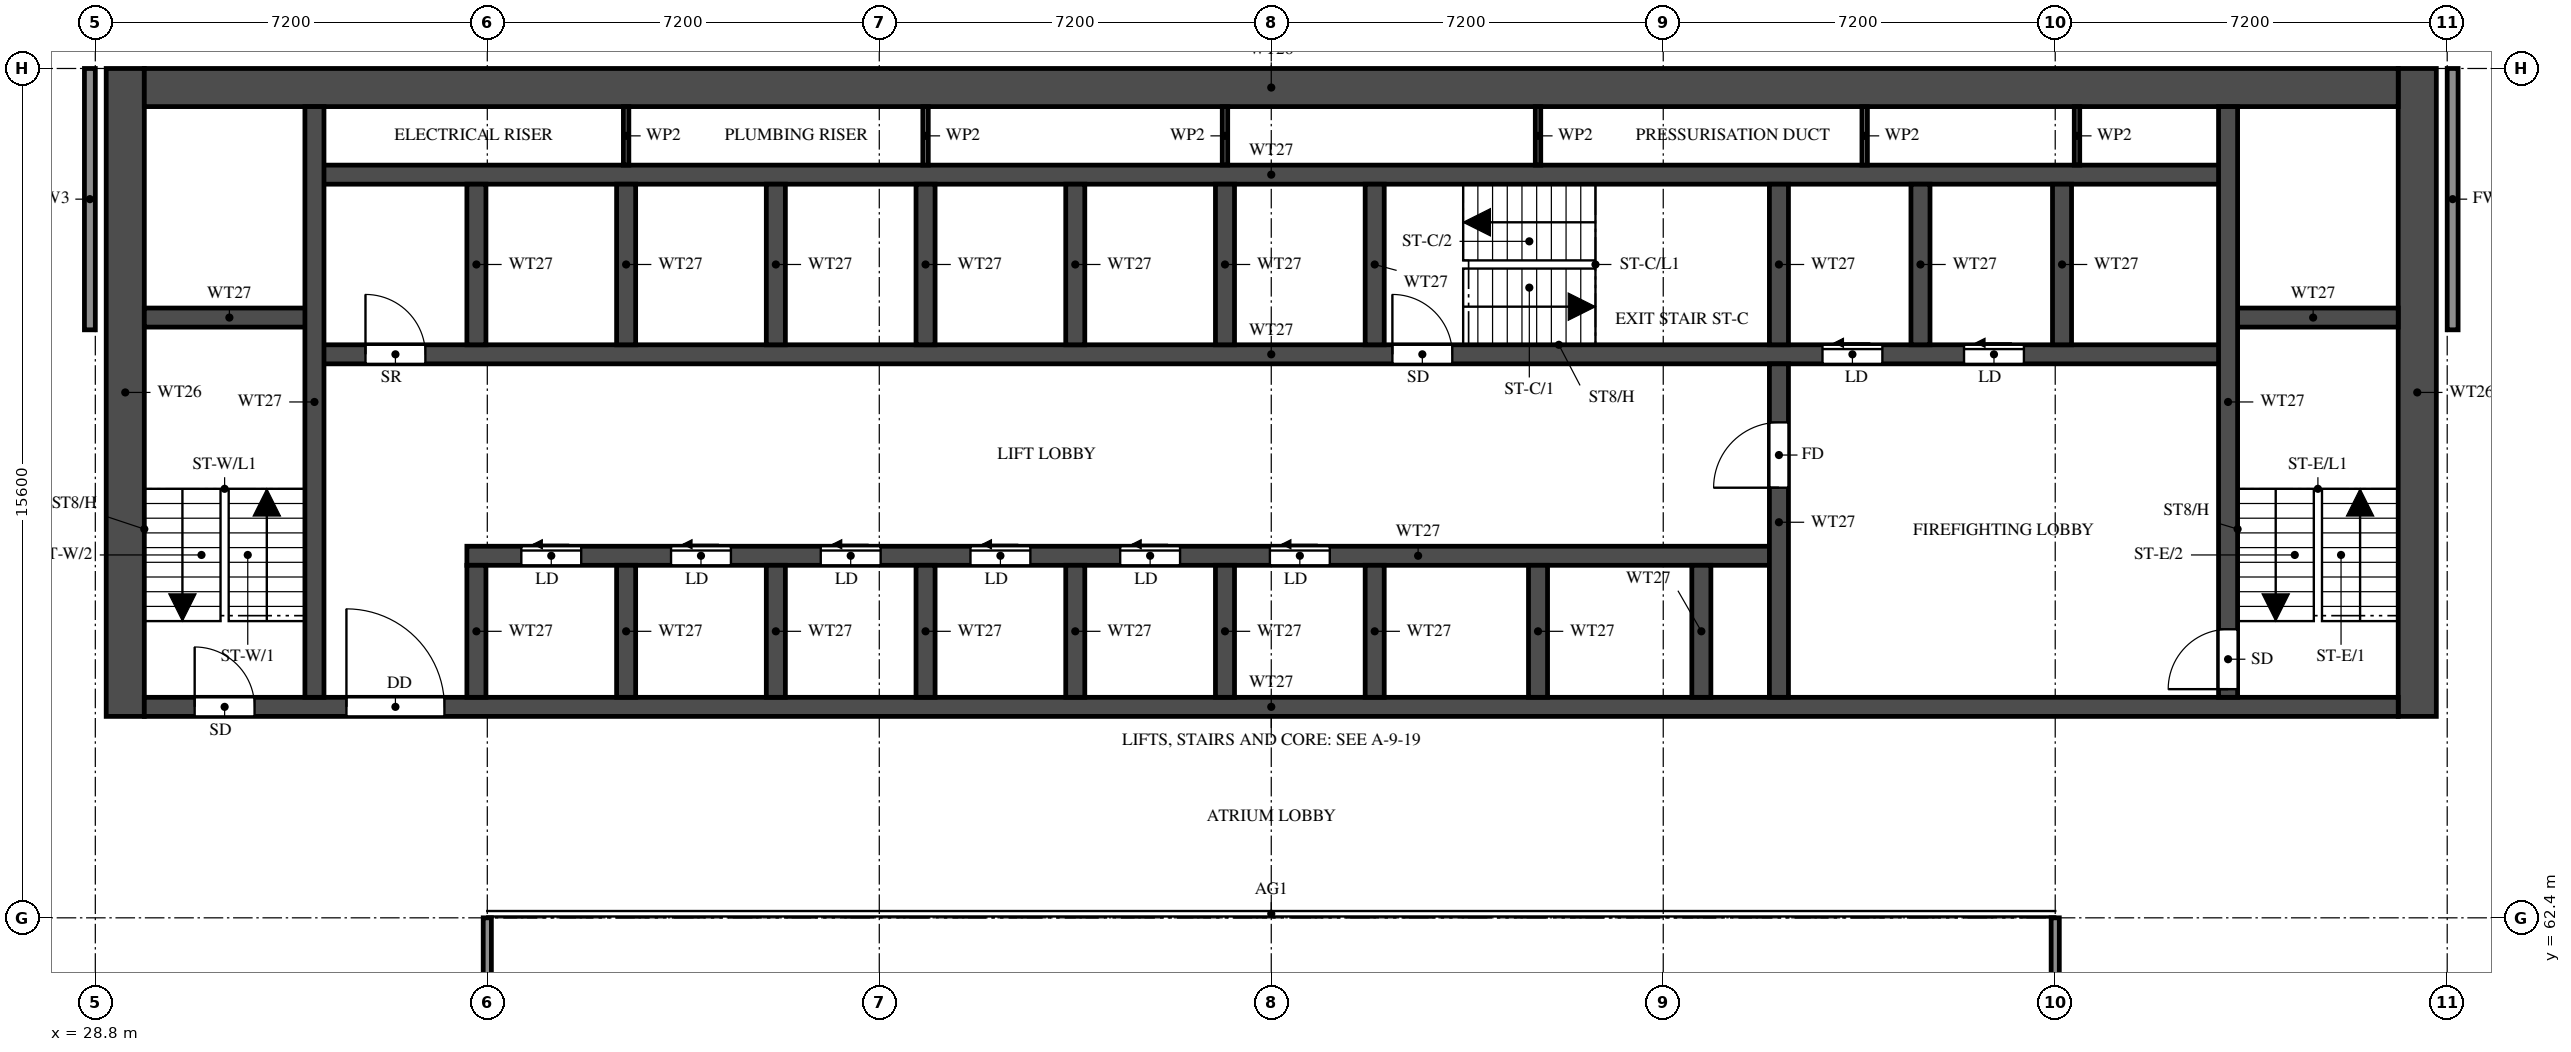
"""IFC4 building model, lengths in metres.
Left out: names, types, materials, properties, quantities, classifications, styles, units other than length and angle.
Written with IfcOpenShell. Run it as: python <this file> out.ifc"""

import sys

from ifc_helpers import new_model, si_unit, direction, frame, frame_2d, origin, place, context, subcontext, project, spatial, rectangle, extrude, element, fill, save


model = new_model("IFC4")
c1 = context("Model", 3, precision=1e-05, world=origin(), true_north=direction((0.0, 1.0)))
c2 = subcontext(c1, "Body", "Model", "MODEL_VIEW")
j1 = project(units=[si_unit("LENGTHUNIT", "METRE"), si_unit("PLANEANGLEUNIT", "RADIAN")], contexts=[c1])
p1 = place(None, origin())
s1 = spatial("IfcSite", under=j1, at=p1, CompositionType="ELEMENT")
p2 = place(p1, origin())
s2 = spatial("IfcBuilding", under=s1, at=p2, CompositionType="ELEMENT")
p3 = place(p2, frame((0.0, 0.0, 130.5)))
s3 = spatial("IfcBuildingStorey", under=s2, at=p3, CompositionType="ELEMENT", Elevation=130.5)
for number, where, z_axis, x_axis in (
    (1, (29.35, 66.1, 0.0), (0.0, 0.0, 1.0), (0.0, 1.0, 0.0)),
    (2, (71.45, 66.1, 0.0), (0.0, 0.0, 1.0), (0.0, 1.0, 0.0)),
):
    element("IfcWall", number, at=place(p3, frame(where, z_axis=z_axis, x_axis=x_axis)), inside=s3, PredefinedType="SHEAR", context=c2, shape_type="SweptSolid", body=[
        extrude(rectangle(XDim=11.9, YDim=0.7, at=frame_2d((5.95, 0.0))), origin(), (0.0, 0.0, 1.0), 3.2),
    ])
p4 = place(p3, frame((29.7, 77.65, 0.0), z_axis=(0.0, 0.0, 1.0), x_axis=(1.0, 0.0, 0.0)))
e3 = element("IfcWall", 3, at=p4, inside=s3, PredefinedType="SHEAR", context=c2, shape_type="SweptSolid", body=[
    extrude(rectangle(XDim=41.4, YDim=0.7, at=frame_2d((20.7, 0.0))), origin(), (0.0, 0.0, 1.0), 3.2),
])
p5 = place(p3, frame((29.7, 66.275, 0.0), z_axis=(0.0, 0.0, 1.0), x_axis=(1.0, 0.0, 0.0)))
e4 = element("IfcWall", 4, at=p5, inside=s3, PredefinedType="SHEAR", context=c2, shape_type="SweptSolid", body=[
    extrude(rectangle(XDim=41.4, YDim=0.35, at=frame_2d((20.7, 0.0))), origin(), (0.0, 0.0, 1.0), 3.2),
])
p6 = place(p5, frame((0.925, 0.0, 0.0)))
e5 = element("IfcOpeningElement", 5, at=p6, cuts=e4, PredefinedType="OPENING", context=c2, shape_type="SweptSolid", body=[
    extrude(rectangle(XDim=1.1, YDim=2.1, at=frame_2d((0.55, 1.05))), frame((0.0, 0.185, 0.0), z_axis=(0.0, -1.0, 0.0), x_axis=(1.0, 0.0, 0.0)), (0.0, 0.0, 1.0), 0.37),
])
p7 = place(p5, frame((3.712, 0.0, 0.0)))
e6 = element("IfcOpeningElement", 6, at=p7, cuts=e4, PredefinedType="OPENING", context=c2, shape_type="SweptSolid", body=[
    extrude(rectangle(XDim=1.8, YDim=2.1, at=frame_2d((0.9, 1.05))), frame((0.0, 0.185, 0.0), z_axis=(0.0, -1.0, 0.0), x_axis=(1.0, 0.0, 0.0)), (0.0, 0.0, 1.0), 0.37),
])
p8 = place(p3, frame((35.625, 69.05, 0.0), z_axis=(0.0, 0.0, 1.0), x_axis=(1.0, 0.0, 0.0)))
e7 = element("IfcWall", 7, at=p8, inside=s3, PredefinedType="SHEAR", context=c2, shape_type="SweptSolid", body=[
    extrude(rectangle(XDim=24.1, YDim=0.35, at=frame_2d((12.05, 0.0))), origin(), (0.0, 0.0, 1.0), 3.2),
])
p9 = place(p8, frame((1.0, 0.0, 0.0)))
e8 = element("IfcOpeningElement", 8, at=p9, cuts=e7, PredefinedType="OPENING", context=c2, shape_type="SweptSolid", body=[
    extrude(rectangle(XDim=1.1, YDim=2.1, at=frame_2d((0.55, 1.05))), frame((0.0, 0.185, 0.0), z_axis=(0.0, -1.0, 0.0), x_axis=(1.0, 0.0, 0.0)), (0.0, 0.0, 1.0), 0.37),
])
p10 = place(p8, frame((3.75, 0.0, 0.0)))
e9 = element("IfcOpeningElement", 9, at=p10, cuts=e7, PredefinedType="OPENING", context=c2, shape_type="SweptSolid", body=[
    extrude(rectangle(XDim=1.1, YDim=2.1, at=frame_2d((0.55, 1.05))), frame((0.0, 0.185, 0.0), z_axis=(0.0, -1.0, 0.0), x_axis=(1.0, 0.0, 0.0)), (0.0, 0.0, 1.0), 0.37),
])
p11 = place(p8, frame((6.5, 0.0, 0.0)))
e10 = element("IfcOpeningElement", 10, at=p11, cuts=e7, PredefinedType="OPENING", context=c2, shape_type="SweptSolid", body=[
    extrude(rectangle(XDim=1.1, YDim=2.1, at=frame_2d((0.55, 1.05))), frame((0.0, 0.185, 0.0), z_axis=(0.0, -1.0, 0.0), x_axis=(1.0, 0.0, 0.0)), (0.0, 0.0, 1.0), 0.37),
])
p12 = place(p8, frame((9.25, 0.0, 0.0)))
e11 = element("IfcOpeningElement", 11, at=p12, cuts=e7, PredefinedType="OPENING", context=c2, shape_type="SweptSolid", body=[
    extrude(rectangle(XDim=1.1, YDim=2.1, at=frame_2d((0.55, 1.05))), frame((0.0, 0.185, 0.0), z_axis=(0.0, -1.0, 0.0), x_axis=(1.0, 0.0, 0.0)), (0.0, 0.0, 1.0), 0.37),
])
p13 = place(p8, frame((12.0, 0.0, 0.0)))
e12 = element("IfcOpeningElement", 12, at=p13, cuts=e7, PredefinedType="OPENING", context=c2, shape_type="SweptSolid", body=[
    extrude(rectangle(XDim=1.1, YDim=2.1, at=frame_2d((0.55, 1.05))), frame((0.0, 0.185, 0.0), z_axis=(0.0, -1.0, 0.0), x_axis=(1.0, 0.0, 0.0)), (0.0, 0.0, 1.0), 0.37),
])
p14 = place(p8, frame((14.75, 0.0, 0.0)))
e13 = element("IfcOpeningElement", 13, at=p14, cuts=e7, PredefinedType="OPENING", context=c2, shape_type="SweptSolid", body=[
    extrude(rectangle(XDim=1.1, YDim=2.1, at=frame_2d((0.55, 1.05))), frame((0.0, 0.185, 0.0), z_axis=(0.0, -1.0, 0.0), x_axis=(1.0, 0.0, 0.0)), (0.0, 0.0, 1.0), 0.37),
])
p15 = place(p3, frame((32.825, 72.75, 0.0), z_axis=(0.0, 0.0, 1.0), x_axis=(1.0, 0.0, 0.0)))
e14 = element("IfcWall", 14, at=p15, inside=s3, PredefinedType="SHEAR", context=c2, shape_type="SweptSolid", body=[
    extrude(rectangle(XDim=35.15, YDim=0.35, at=frame_2d((17.575, 0.0))), origin(), (0.0, 0.0, 1.0), 3.2),
])
p16 = place(p15, frame((19.8, 0.0, 0.0)))
e15 = element("IfcOpeningElement", 15, at=p16, cuts=e14, PredefinedType="OPENING", context=c2, shape_type="SweptSolid", body=[
    extrude(rectangle(XDim=1.1, YDim=2.1, at=frame_2d((0.55, 1.05))), frame((0.0, 0.185, 0.0), z_axis=(0.0, -1.0, 0.0), x_axis=(1.0, 0.0, 0.0)), (0.0, 0.0, 1.0), 0.37),
])
p17 = place(p15, frame((27.7, 0.0, 0.0)))
e16 = element("IfcOpeningElement", 16, at=p17, cuts=e14, PredefinedType="OPENING", context=c2, shape_type="SweptSolid", body=[
    extrude(rectangle(XDim=1.1, YDim=2.1, at=frame_2d((0.55, 1.05))), frame((0.0, 0.185, 0.0), z_axis=(0.0, -1.0, 0.0), x_axis=(1.0, 0.0, 0.0)), (0.0, 0.0, 1.0), 0.37),
])
p18 = place(p15, frame((30.3, 0.0, 0.0)))
e17 = element("IfcOpeningElement", 17, at=p18, cuts=e14, PredefinedType="OPENING", context=c2, shape_type="SweptSolid", body=[
    extrude(rectangle(XDim=1.1, YDim=2.1, at=frame_2d((0.55, 1.05))), frame((0.0, 0.185, 0.0), z_axis=(0.0, -1.0, 0.0), x_axis=(1.0, 0.0, 0.0)), (0.0, 0.0, 1.0), 0.37),
])
p19 = place(p15, frame((0.938, 0.0, 0.0)))
e18 = element("IfcOpeningElement", 18, at=p19, cuts=e14, PredefinedType="OPENING", context=c2, shape_type="SweptSolid", body=[
    extrude(rectangle(XDim=1.1, YDim=2.1, at=frame_2d((0.55, 1.05))), frame((0.0, 0.185, 0.0), z_axis=(0.0, -1.0, 0.0), x_axis=(1.0, 0.0, 0.0)), (0.0, 0.0, 1.0), 0.37),
])
p20 = place(p3, frame((32.825, 76.05, 0.0), z_axis=(0.0, 0.0, 1.0), x_axis=(1.0, 0.0, 0.0)))
e19 = element("IfcWall", 19, at=p20, inside=s3, PredefinedType="SHEAR", context=c2, shape_type="SweptSolid", body=[
    extrude(rectangle(XDim=35.15, YDim=0.35, at=frame_2d((17.575, 0.0))), origin(), (0.0, 0.0, 1.0), 3.2),
])
for number, where, z_axis, x_axis in (
    (20, (29.7, 73.425, 0.0), (0.0, 0.0, 1.0), (1.0, 0.0, 0.0)),
    (21, (67.975, 73.425, 0.0), (0.0, 0.0, 1.0), (1.0, 0.0, 0.0)),
):
    element("IfcWall", number, at=place(p3, frame(where, z_axis=z_axis, x_axis=x_axis)), inside=s3, PredefinedType="SHEAR", context=c2, shape_type="SweptSolid", body=[
        extrude(rectangle(XDim=3.125, YDim=0.35, at=frame_2d((1.562, 0.0))), origin(), (0.0, 0.0, 1.0), 3.2),
    ])
p21 = place(p3, frame((32.825, 66.45, 0.0), z_axis=(0.0, 0.0, 1.0), x_axis=(0.0, 1.0, 0.0)))
e22 = element("IfcWall", 22, at=p21, inside=s3, PredefinedType="SHEAR", context=c2, shape_type="SweptSolid", body=[
    extrude(rectangle(XDim=10.85, YDim=0.35, at=frame_2d((5.425, 0.0))), origin(), (0.0, 0.0, 1.0), 3.2),
])
p22 = place(p3, frame((67.975, 66.45, 0.0), z_axis=(0.0, 0.0, 1.0), x_axis=(0.0, 1.0, 0.0)))
e23 = element("IfcWall", 23, at=p22, inside=s3, PredefinedType="SHEAR", context=c2, shape_type="SweptSolid", body=[
    extrude(rectangle(XDim=10.85, YDim=0.35, at=frame_2d((5.425, 0.0))), origin(), (0.0, 0.0, 1.0), 3.2),
])
p23 = place(p22, frame((0.15, 0.0, 0.0)))
e24 = element("IfcOpeningElement", 24, at=p23, cuts=e23, PredefinedType="OPENING", context=c2, shape_type="SweptSolid", body=[
    extrude(rectangle(XDim=1.1, YDim=2.1, at=frame_2d((0.55, 1.05))), frame((0.0, 0.185, 0.0), z_axis=(0.0, -1.0, 0.0), x_axis=(1.0, 0.0, 0.0)), (0.0, 0.0, 1.0), 0.37),
])
p24 = place(p3, frame((59.725, 66.45, 0.0), z_axis=(0.0, 0.0, 1.0), x_axis=(0.0, 1.0, 0.0)))
e25 = element("IfcWall", 25, at=p24, inside=s3, PredefinedType="SHEAR", context=c2, shape_type="SweptSolid", body=[
    extrude(rectangle(XDim=6.125, YDim=0.35, at=frame_2d((3.062, 0.0))), origin(), (0.0, 0.0, 1.0), 3.2),
])
p25 = place(p24, frame((3.85, 0.0, 0.0)))
e26 = element("IfcOpeningElement", 26, at=p25, cuts=e25, PredefinedType="OPENING", context=c2, shape_type="SweptSolid", body=[
    extrude(rectangle(XDim=1.2, YDim=2.1, at=frame_2d((0.6, 1.05))), frame((0.0, 0.185, 0.0), z_axis=(0.0, -1.0, 0.0), x_axis=(1.0, 0.0, 0.0)), (0.0, 0.0, 1.0), 0.37),
])
p26 = place(p3, frame((59.725, 72.925, 0.0), z_axis=(0.0, 0.0, 1.0), x_axis=(0.0, 1.0, 0.0)))
e27 = element("IfcWall", 27, at=p26, inside=s3, PredefinedType="SHEAR", context=c2, shape_type="SweptSolid", body=[
    extrude(rectangle(XDim=2.95, YDim=0.35, at=frame_2d((1.475, 0.0))), origin(), (0.0, 0.0, 1.0), 3.2),
])
for number, where, z_axis, x_axis in (
    (28, (35.8, 66.45, 0.0), (0.0, 0.0, 1.0), (0.0, 1.0, 0.0)),
    (29, (38.55, 66.45, 0.0), (0.0, 0.0, 1.0), (0.0, 1.0, 0.0)),
    (30, (41.3, 66.45, 0.0), (0.0, 0.0, 1.0), (0.0, 1.0, 0.0)),
    (31, (44.05, 66.45, 0.0), (0.0, 0.0, 1.0), (0.0, 1.0, 0.0)),
    (32, (46.8, 66.45, 0.0), (0.0, 0.0, 1.0), (0.0, 1.0, 0.0)),
    (33, (49.55, 66.45, 0.0), (0.0, 0.0, 1.0), (0.0, 1.0, 0.0)),
    (34, (52.3, 66.45, 0.0), (0.0, 0.0, 1.0), (0.0, 1.0, 0.0)),
    (35, (55.3, 66.45, 0.0), (0.0, 0.0, 1.0), (0.0, 1.0, 0.0)),
    (36, (58.3, 66.45, 0.0), (0.0, 0.0, 1.0), (0.0, 1.0, 0.0)),
):
    element("IfcWall", number, at=place(p3, frame(where, z_axis=z_axis, x_axis=x_axis)), inside=s3, PredefinedType="SHEAR", context=c2, shape_type="SweptSolid", body=[
        extrude(rectangle(XDim=2.425, YDim=0.35, at=frame_2d((1.212, 0.0))), origin(), (0.0, 0.0, 1.0), 3.2),
    ])
for number, where, z_axis, x_axis in (
    (37, (35.8, 72.925, 0.0), (0.0, 0.0, 1.0), (0.0, 1.0, 0.0)),
    (38, (38.55, 72.925, 0.0), (0.0, 0.0, 1.0), (0.0, 1.0, 0.0)),
    (39, (41.3, 72.925, 0.0), (0.0, 0.0, 1.0), (0.0, 1.0, 0.0)),
    (40, (44.05, 72.925, 0.0), (0.0, 0.0, 1.0), (0.0, 1.0, 0.0)),
    (41, (46.8, 72.925, 0.0), (0.0, 0.0, 1.0), (0.0, 1.0, 0.0)),
    (42, (49.55, 72.925, 0.0), (0.0, 0.0, 1.0), (0.0, 1.0, 0.0)),
    (43, (52.3, 72.925, 0.0), (0.0, 0.0, 1.0), (0.0, 1.0, 0.0)),
    (44, (62.325, 72.925, 0.0), (0.0, 0.0, 1.0), (0.0, 1.0, 0.0)),
    (45, (64.925, 72.925, 0.0), (0.0, 0.0, 1.0), (0.0, 1.0, 0.0)),
):
    element("IfcWall", number, at=place(p3, frame(where, z_axis=z_axis, x_axis=x_axis)), inside=s3, PredefinedType="SHEAR", context=c2, shape_type="SweptSolid", body=[
        extrude(rectangle(XDim=2.95, YDim=0.35, at=frame_2d((1.475, 0.0))), origin(), (0.0, 0.0, 1.0), 3.2),
    ])
for number, where, z_axis, x_axis in (
    (46, (38.55, 76.225, 0.0), (0.0, 0.0, 1.0), (0.0, 1.0, 0.0)),
    (47, (44.05, 76.225, 0.0), (0.0, 0.0, 1.0), (0.0, 1.0, 0.0)),
    (48, (49.55, 76.225, 0.0), (0.0, 0.0, 1.0), (0.0, 1.0, 0.0)),
    (49, (55.3, 76.225, 0.0), (0.0, 0.0, 1.0), (0.0, 1.0, 0.0)),
    (50, (61.3, 76.225, 0.0), (0.0, 0.0, 1.0), (0.0, 1.0, 0.0)),
    (51, (65.2, 76.225, 0.0), (0.0, 0.0, 1.0), (0.0, 1.0, 0.0)),
):
    element("IfcWall", number, at=place(p3, frame(where, z_axis=z_axis, x_axis=x_axis)), inside=s3, PredefinedType="PARTITIONING", context=c2, shape_type="SweptSolid", body=[
        extrude(rectangle(XDim=1.075, YDim=0.1, at=frame_2d((0.538, 0.0))), origin(), (0.0, 0.0, 1.0), 3.2),
    ])
for number, where, z_axis, x_axis in (
    (52, (28.7, 73.2, 0.0), (0.0, 0.0, 1.0), (0.0, 1.0, 0.0)),
    (53, (72.1, 73.2, 0.0), (0.0, 0.0, 1.0), (0.0, 1.0, 0.0)),
):
    element("IfcWall", number, at=place(p3, frame(where, z_axis=z_axis, x_axis=x_axis)), inside=s3, PredefinedType="SOLIDWALL", context=c2, shape_type="SweptSolid", body=[
        extrude(rectangle(XDim=4.8, YDim=0.2, at=frame_2d((2.4, 0.0))), origin(), (0.0, 0.0, 1.0), 3.2),
    ])
for number, where, z_axis, x_axis in (
    (54, (36.0, 48.0, 0.0), (0.0, 0.0, 1.0), (0.0, 1.0, 0.0)),
    (55, (64.8, 48.0, 0.0), (0.0, 0.0, 1.0), (0.0, 1.0, 0.0)),
):
    element("IfcWall", number, at=place(p3, frame(where, z_axis=z_axis, x_axis=x_axis)), inside=s3, PredefinedType="SOLIDWALL", context=c2, shape_type="SweptSolid", body=[
        extrude(rectangle(XDim=14.4, YDim=0.15, at=frame_2d((7.2, 0.0))), origin(), (0.0, 0.0, 1.0), 2.3),
    ])
p27 = place(p6, origin())
e56 = element("IfcDoor", 56, at=p27, inside=s3, OperationType="SINGLE_SWING_LEFT", PredefinedType="DOOR", context=c2, shape_type="SweptSolid", body=[
    extrude(rectangle(XDim=1.1, YDim=2.1, at=frame_2d((0.55, 1.05))), frame((0.0, 0.025, 0.0), z_axis=(0.0, -1.0, 0.0), x_axis=(1.0, 0.0, 0.0)), (0.0, 0.0, 1.0), 0.05),
])
fill(e5, e56)
p28 = place(p16, origin())
e57 = element("IfcDoor", 57, at=p28, inside=s3, OperationType="SINGLE_SWING_LEFT", PredefinedType="DOOR", context=c2, shape_type="SweptSolid", body=[
    extrude(rectangle(XDim=1.1, YDim=2.1, at=frame_2d((0.55, 1.05))), frame((0.0, 0.025, 0.0), z_axis=(0.0, -1.0, 0.0), x_axis=(1.0, 0.0, 0.0)), (0.0, 0.0, 1.0), 0.05),
])
fill(e15, e57)
p29 = place(p23, origin())
e58 = element("IfcDoor", 58, at=p29, inside=s3, OperationType="SINGLE_SWING_LEFT", PredefinedType="DOOR", context=c2, shape_type="SweptSolid", body=[
    extrude(rectangle(XDim=1.1, YDim=2.1, at=frame_2d((0.55, 1.05))), frame((0.0, 0.025, 0.0), z_axis=(0.0, -1.0, 0.0), x_axis=(1.0, 0.0, 0.0)), (0.0, 0.0, 1.0), 0.05),
])
fill(e24, e58)
p30 = place(p7, origin())
e59 = element("IfcDoor", 59, at=p30, inside=s3, OperationType="DOUBLE_DOOR_SINGLE_SWING", PredefinedType="DOOR", context=c2, shape_type="SweptSolid", body=[
    extrude(rectangle(XDim=1.8, YDim=2.1, at=frame_2d((0.9, 1.05))), frame((0.0, 0.025, 0.0), z_axis=(0.0, -1.0, 0.0), x_axis=(1.0, 0.0, 0.0)), (0.0, 0.0, 1.0), 0.05),
])
fill(e6, e59)
p31 = place(p25, origin())
e60 = element("IfcDoor", 60, at=p31, inside=s3, OperationType="SINGLE_SWING_LEFT", PredefinedType="DOOR", context=c2, shape_type="SweptSolid", body=[
    extrude(rectangle(XDim=1.2, YDim=2.1, at=frame_2d((0.6, 1.05))), frame((0.0, 0.025, 0.0), z_axis=(0.0, -1.0, 0.0), x_axis=(1.0, 0.0, 0.0)), (0.0, 0.0, 1.0), 0.05),
])
fill(e26, e60)
p32 = place(p17, origin())
e61 = element("IfcDoor", 61, at=p32, inside=s3, OperationType="SLIDING_TO_LEFT", PredefinedType="DOOR", context=c2, shape_type="SweptSolid", body=[
    extrude(rectangle(XDim=1.1, YDim=2.1, at=frame_2d((0.55, 1.05))), frame((0.0, 0.025, 0.0), z_axis=(0.0, -1.0, 0.0), x_axis=(1.0, 0.0, 0.0)), (0.0, 0.0, 1.0), 0.05),
])
fill(e16, e61)
p33 = place(p18, origin())
e62 = element("IfcDoor", 62, at=p33, inside=s3, OperationType="SLIDING_TO_LEFT", PredefinedType="DOOR", context=c2, shape_type="SweptSolid", body=[
    extrude(rectangle(XDim=1.1, YDim=2.1, at=frame_2d((0.55, 1.05))), frame((0.0, 0.025, 0.0), z_axis=(0.0, -1.0, 0.0), x_axis=(1.0, 0.0, 0.0)), (0.0, 0.0, 1.0), 0.05),
])
fill(e17, e62)
p34 = place(p9, origin())
e63 = element("IfcDoor", 63, at=p34, inside=s3, OperationType="SLIDING_TO_LEFT", PredefinedType="DOOR", context=c2, shape_type="SweptSolid", body=[
    extrude(rectangle(XDim=1.1, YDim=2.1, at=frame_2d((0.55, 1.05))), frame((0.0, 0.025, 0.0), z_axis=(0.0, -1.0, 0.0), x_axis=(1.0, 0.0, 0.0)), (0.0, 0.0, 1.0), 0.05),
])
fill(e8, e63)
p35 = place(p10, origin())
e64 = element("IfcDoor", 64, at=p35, inside=s3, OperationType="SLIDING_TO_LEFT", PredefinedType="DOOR", context=c2, shape_type="SweptSolid", body=[
    extrude(rectangle(XDim=1.1, YDim=2.1, at=frame_2d((0.55, 1.05))), frame((0.0, 0.025, 0.0), z_axis=(0.0, -1.0, 0.0), x_axis=(1.0, 0.0, 0.0)), (0.0, 0.0, 1.0), 0.05),
])
fill(e9, e64)
p36 = place(p11, origin())
e65 = element("IfcDoor", 65, at=p36, inside=s3, OperationType="SLIDING_TO_LEFT", PredefinedType="DOOR", context=c2, shape_type="SweptSolid", body=[
    extrude(rectangle(XDim=1.1, YDim=2.1, at=frame_2d((0.55, 1.05))), frame((0.0, 0.025, 0.0), z_axis=(0.0, -1.0, 0.0), x_axis=(1.0, 0.0, 0.0)), (0.0, 0.0, 1.0), 0.05),
])
fill(e10, e65)
p37 = place(p12, origin())
e66 = element("IfcDoor", 66, at=p37, inside=s3, OperationType="SLIDING_TO_LEFT", PredefinedType="DOOR", context=c2, shape_type="SweptSolid", body=[
    extrude(rectangle(XDim=1.1, YDim=2.1, at=frame_2d((0.55, 1.05))), frame((0.0, 0.025, 0.0), z_axis=(0.0, -1.0, 0.0), x_axis=(1.0, 0.0, 0.0)), (0.0, 0.0, 1.0), 0.05),
])
fill(e11, e66)
p38 = place(p13, origin())
e67 = element("IfcDoor", 67, at=p38, inside=s3, OperationType="SLIDING_TO_LEFT", PredefinedType="DOOR", context=c2, shape_type="SweptSolid", body=[
    extrude(rectangle(XDim=1.1, YDim=2.1, at=frame_2d((0.55, 1.05))), frame((0.0, 0.025, 0.0), z_axis=(0.0, -1.0, 0.0), x_axis=(1.0, 0.0, 0.0)), (0.0, 0.0, 1.0), 0.05),
])
fill(e12, e67)
p39 = place(p14, origin())
e68 = element("IfcDoor", 68, at=p39, inside=s3, OperationType="SLIDING_TO_LEFT", PredefinedType="DOOR", context=c2, shape_type="SweptSolid", body=[
    extrude(rectangle(XDim=1.1, YDim=2.1, at=frame_2d((0.55, 1.05))), frame((0.0, 0.025, 0.0), z_axis=(0.0, -1.0, 0.0), x_axis=(1.0, 0.0, 0.0)), (0.0, 0.0, 1.0), 0.05),
])
fill(e13, e68)
p40 = place(p19, origin())
e69 = element("IfcDoor", 69, at=p40, inside=s3, OperationType="SINGLE_SWING_LEFT", PredefinedType="DOOR", context=c2, shape_type="SweptSolid", body=[
    extrude(rectangle(XDim=1.1, YDim=2.1, at=frame_2d((0.55, 1.05))), frame((0.0, 0.025, 0.0), z_axis=(0.0, -1.0, 0.0), x_axis=(1.0, 0.0, 0.0)), (0.0, 0.0, 1.0), 0.05),
])
fill(e18, e69)
save(model, sys.argv[1])
